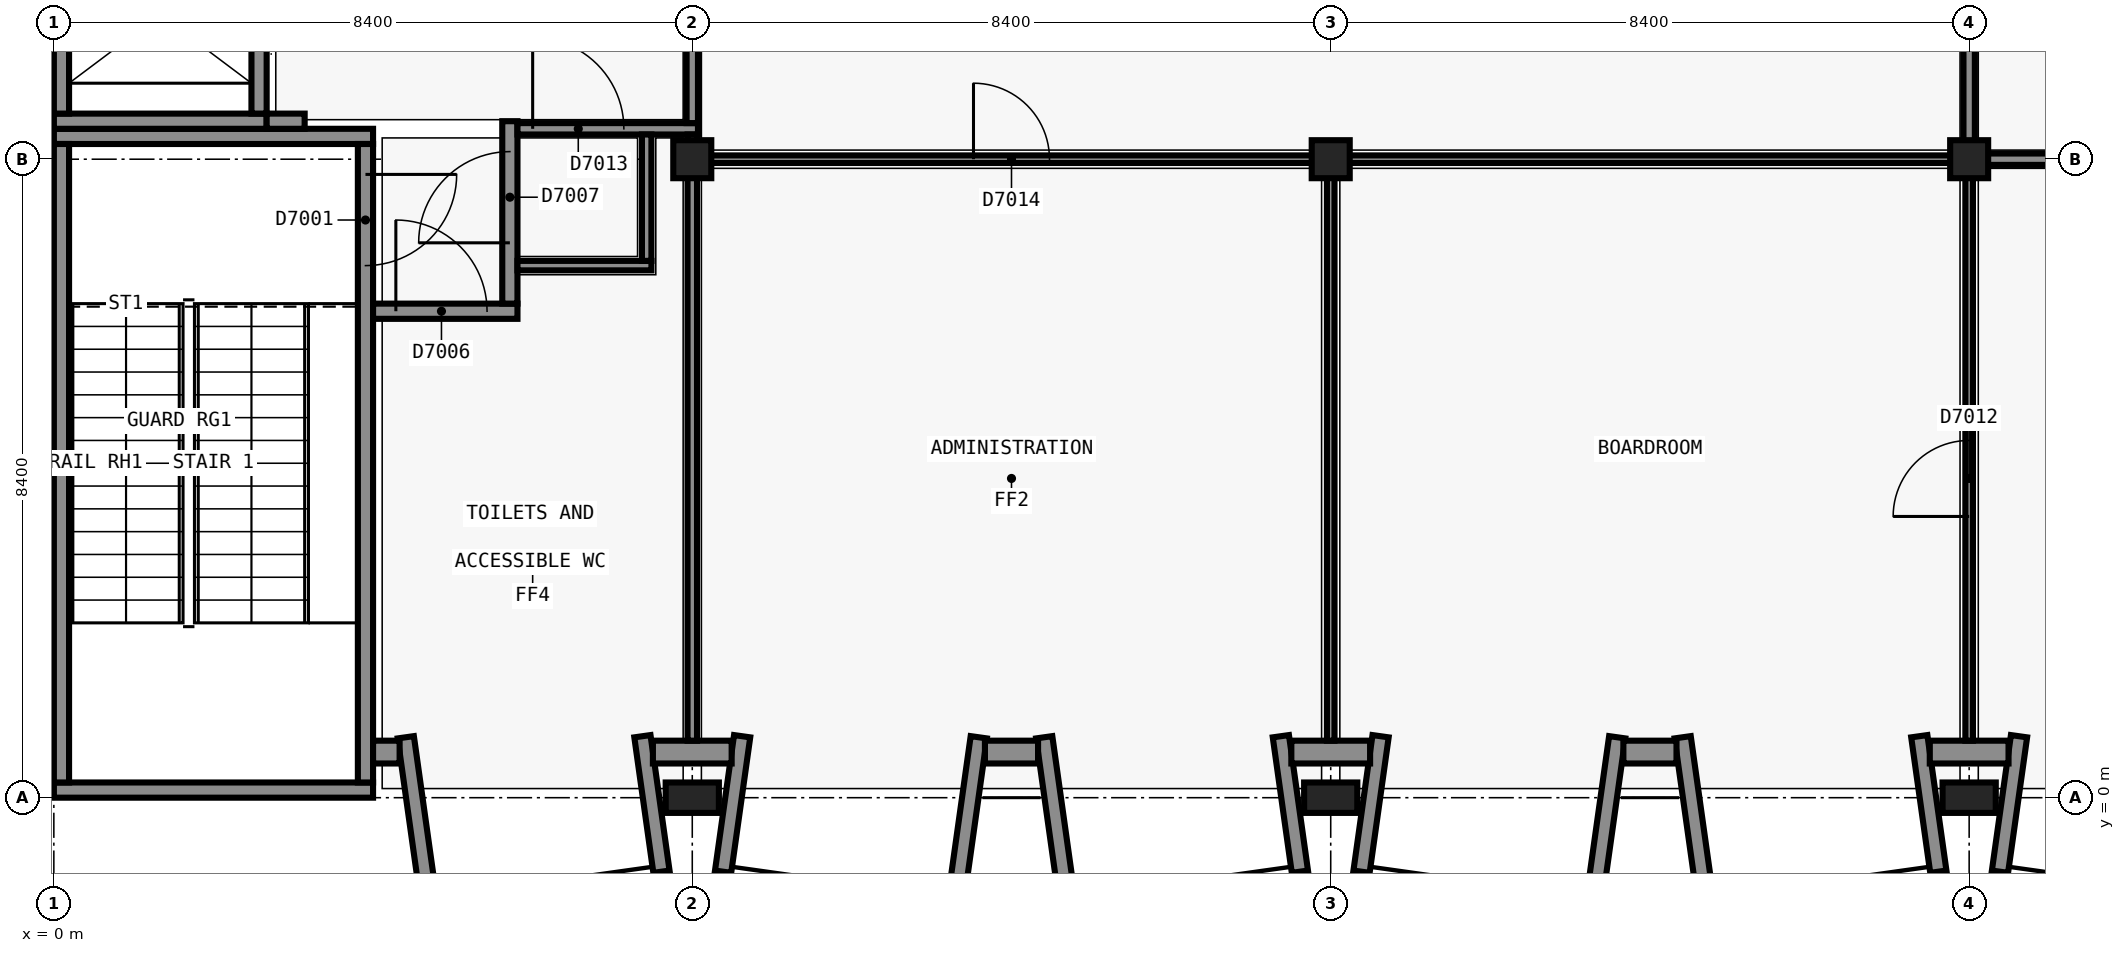
"""IFC4 building model, lengths in metres.
Left out: names, types, materials, properties, quantities, classifications, styles, units other than length and angle.
Written with IfcOpenShell. Run it as: python <this file> out.ifc"""

import sys

from ifc_helpers import new_model, si_unit, direction, frame, frame_2d, origin, origin_2d, place, context, subcontext, project, spatial, rectangle, extrude, element, fill, save


model = new_model("IFC4")
c1 = context("Model", 3, precision=1e-05, world=origin(), true_north=direction((0.0, 1.0)))
c2 = subcontext(c1, "Body", "Model", "MODEL_VIEW")
j1 = project(units=[si_unit("LENGTHUNIT", "METRE"), si_unit("PLANEANGLEUNIT", "RADIAN")], contexts=[c1])
p1 = place(None, origin())
s1 = spatial("IfcSite", under=j1, at=p1, CompositionType="ELEMENT")
p2 = place(p1, origin())
s2 = spatial("IfcBuilding", under=s1, at=p2, CompositionType="ELEMENT")
p3 = place(p2, frame((0.0, 0.0, 33.6)))
s3 = spatial("IfcBuildingStorey", under=s2, at=p3, CompositionType="ELEMENT", Elevation=33.6)
for number, where, z_axis, x_axis in (
    (1, (4.2, 0.1, 0.0), (0.0, 0.0, 1.0), (-1.0, 0.0, 0.0)),
    (2, (0.0, 8.7, 0.0), (0.0, 0.0, 1.0), (1.0, 0.0, 0.0)),
):
    element("IfcWall", number, at=place(p3, frame(where, z_axis=z_axis, x_axis=x_axis)), inside=s3, PredefinedType="SHEAR", context=c2, shape_type="SweptSolid", body=[
        extrude(rectangle(XDim=4.199, YDim=0.2, at=frame_2d((2.1, 0.0))), origin(), (0.0, 0.0, 1.0), 4.5),
    ])
p4 = place(p3, frame((0.1, 0.2, 0.0), z_axis=(0.0, 0.0, 1.0), x_axis=(0.0, 1.0, 0.0)))
e3 = element("IfcWall", 3, at=p4, inside=s3, PredefinedType="SHEAR", context=c2, shape_type="SweptSolid", body=[
    extrude(rectangle(XDim=8.4, YDim=0.2, at=frame_2d((4.2, 0.0))), origin(), (0.0, 0.0, 1.0), 4.5),
])
p5 = place(p3, frame((4.1, 8.6, 0.0), z_axis=(0.0, 0.0, 1.0), x_axis=(0.0, -1.0, 0.0)))
e4 = element("IfcWall", 4, at=p5, inside=s3, PredefinedType="SHEAR", context=c2, shape_type="SweptSolid", body=[
    extrude(rectangle(XDim=8.4, YDim=0.2, at=frame_2d((4.2, 0.0))), origin(), (0.0, 0.0, 1.0), 4.5),
])
p6 = place(p5, frame((0.4, 0.0, 0.0)))
e5 = element("IfcOpeningElement", 5, at=p6, cuts=e4, PredefinedType="OPENING", context=c2, shape_type="SweptSolid", body=[
    extrude(rectangle(XDim=1.2, YDim=2.1, at=frame_2d((0.6, 1.05))), frame((0.0, 0.11, 0.0), z_axis=(0.0, -1.0, 0.0), x_axis=(1.0, 0.0, 0.0)), (0.0, 0.0, 1.0), 0.22),
])
p7 = place(p3, frame((2.8, 8.9, 0.0), z_axis=(0.0, 0.0, 1.0), x_axis=(-1.0, 0.0, 0.0)))
e6 = element("IfcWall", 6, at=p7, inside=s3, PredefinedType="SHEAR", context=c2, shape_type="SweptSolid", body=[
    extrude(rectangle(XDim=2.8, YDim=0.2, at=frame_2d((1.4, 0.0))), origin(), (0.0, 0.0, 1.0), 4.5),
])
p8 = place(p3, frame((0.1, 9.0, 0.0), z_axis=(0.0, 0.0, 1.0), x_axis=(0.0, 1.0, 0.0)))
e7 = element("IfcWall", 7, at=p8, inside=s3, PredefinedType="SHEAR", context=c2, shape_type="SweptSolid", body=[
    extrude(rectangle(XDim=2.7, YDim=0.2, at=frame_2d((1.35, 0.0))), origin(), (0.0, 0.0, 1.0), 4.5),
])
p9 = place(p3, frame((2.7, 11.7, 0.0), z_axis=(0.0, 0.0, 1.0), x_axis=(0.0, -1.0, 0.0)))
e8 = element("IfcWall", 8, at=p9, inside=s3, PredefinedType="SHEAR", context=c2, shape_type="SweptSolid", body=[
    extrude(rectangle(XDim=2.7, YDim=0.2, at=frame_2d((1.35, 0.0))), origin(), (0.0, 0.0, 1.0), 4.5),
])
p10 = place(p9, frame((0.85, 0.0, 0.0)))
e9 = element("IfcOpeningElement", 9, at=p10, cuts=e8, PredefinedType="OPENING", context=c2, shape_type="SweptSolid", body=[
    extrude(rectangle(XDim=1.1, YDim=2.1, at=frame_2d((0.55, 1.05))), frame((0.0, 0.11, 0.0), z_axis=(0.0, -1.0, 0.0), x_axis=(1.0, 0.0, 0.0)), (0.0, 0.0, 1.0), 0.22),
])
p11 = place(p3, frame((8.4, 0.0, 0.0), z_axis=(0.0, 0.0, 1.0), x_axis=(1.0, 0.0, 0.0)))
e10 = element("IfcColumn", 10, at=p11, inside=s3, PredefinedType="COLUMN", context=c2, shape_type="SweptSolid", body=[
    extrude(rectangle(XDim=0.7, YDim=0.4, at=origin_2d()), origin(), (0.0, 0.0, 1.0), 4.5),
])
p12 = place(p3, frame((8.4, 8.4, 0.0), z_axis=(0.0, 0.0, 1.0), x_axis=(1.0, 0.0, 0.0)))
e11 = element("IfcColumn", 11, at=p12, inside=s3, PredefinedType="COLUMN", context=c2, shape_type="SweptSolid", body=[
    extrude(rectangle(XDim=0.5, YDim=0.5, at=origin_2d()), origin(), (0.0, 0.0, 1.0), 4.5),
])
p13 = place(p3, frame((16.8, 0.0, 0.0), z_axis=(0.0, 0.0, 1.0), x_axis=(1.0, 0.0, 0.0)))
e12 = element("IfcColumn", 12, at=p13, inside=s3, PredefinedType="COLUMN", context=c2, shape_type="SweptSolid", body=[
    extrude(rectangle(XDim=0.7, YDim=0.4, at=origin_2d()), origin(), (0.0, 0.0, 1.0), 4.5),
])
p14 = place(p3, frame((16.8, 8.4, 0.0), z_axis=(0.0, 0.0, 1.0), x_axis=(1.0, 0.0, 0.0)))
e13 = element("IfcColumn", 13, at=p14, inside=s3, PredefinedType="COLUMN", context=c2, shape_type="SweptSolid", body=[
    extrude(rectangle(XDim=0.5, YDim=0.5, at=origin_2d()), origin(), (0.0, 0.0, 1.0), 4.5),
])
p15 = place(p3, frame((25.2, 0.0, 0.0), z_axis=(0.0, 0.0, 1.0), x_axis=(1.0, 0.0, 0.0)))
e14 = element("IfcColumn", 14, at=p15, inside=s3, PredefinedType="COLUMN", context=c2, shape_type="SweptSolid", body=[
    extrude(rectangle(XDim=0.7, YDim=0.4, at=origin_2d()), origin(), (0.0, 0.0, 1.0), 4.5),
])
p16 = place(p3, frame((25.2, 8.4, 0.0), z_axis=(0.0, 0.0, 1.0), x_axis=(1.0, 0.0, 0.0)))
e15 = element("IfcColumn", 15, at=p16, inside=s3, PredefinedType="COLUMN", context=c2, shape_type="SweptSolid", body=[
    extrude(rectangle(XDim=0.5, YDim=0.5, at=origin_2d()), origin(), (0.0, 0.0, 1.0), 4.5),
])
p17 = place(p3, frame((3.3, 8.9, 0.0), z_axis=(0.0, 0.0, 1.0), x_axis=(-1.0, 0.0, 0.0)))
e16 = element("IfcWall", 16, at=p17, inside=s3, PredefinedType="SHEAR", context=c2, shape_type="SweptSolid", body=[
    extrude(rectangle(XDim=0.5, YDim=0.2, at=frame_2d((0.25, 0.0))), origin(), (0.0, 0.0, 1.0), 4.5),
])
p18 = place(p3, frame((4.631, 0.795, 0.0), z_axis=(0.0, 0.0, 1.0), x_axis=(0.139141913905, -0.990272451295, 0.0)))
e17 = element("IfcWall", 17, at=p18, inside=s3, PredefinedType="SOLIDWALL", context=c2, shape_type="SweptSolid", body=[
    extrude(rectangle(XDim=2.219, YDim=0.215, at=frame_2d((1.11, 0.0))), origin(), (0.0, 0.0, 1.0), 4.2),
])
for number, where, z_axis, x_axis in (
    (18, (7.744, 0.809, 0.0), (0.0, 0.0, 1.0), (0.139, -0.99, 0.0)),
    (19, (9.056, 0.809, 0.0), (0.0, 0.0, 1.0), (-0.139, -0.99, 0.0)),
):
    element("IfcWall", number, at=place(p3, frame(where, z_axis=z_axis, x_axis=x_axis)), inside=s3, PredefinedType="SOLIDWALL", context=c2, shape_type="SweptSolid", body=[
        extrude(rectangle(XDim=1.8, YDim=0.215, at=frame_2d((0.9, 0.0))), origin(), (0.0, 0.0, 1.0), 4.2),
    ])
p19 = place(p3, frame((12.169, 0.795, 0.0), z_axis=(0.0, 0.0, 1.0), x_axis=(-0.139141913905, -0.990272451295, 0.0)))
e20 = element("IfcWall", 20, at=p19, inside=s3, PredefinedType="SOLIDWALL", context=c2, shape_type="SweptSolid", body=[
    extrude(rectangle(XDim=2.219, YDim=0.215, at=frame_2d((1.11, 0.0))), origin(), (0.0, 0.0, 1.0), 4.2),
])
p20 = place(p3, frame((13.031, 0.795, 0.0), z_axis=(0.0, 0.0, 1.0), x_axis=(0.139249775508, -0.99025728981, 0.0)))
e21 = element("IfcWall", 21, at=p20, inside=s3, PredefinedType="SOLIDWALL", context=c2, shape_type="SweptSolid", body=[
    extrude(rectangle(XDim=2.22, YDim=0.215, at=frame_2d((1.11, 0.0))), origin(), (0.0, 0.0, 1.0), 4.2),
])
for number, where, z_axis, x_axis in (
    (22, (16.144, 0.809, 0.0), (0.0, 0.0, 1.0), (0.139, -0.99, 0.0)),
    (23, (17.456, 0.809, 0.0), (0.0, 0.0, 1.0), (-0.139, -0.99, 0.0)),
):
    element("IfcWall", number, at=place(p3, frame(where, z_axis=z_axis, x_axis=x_axis)), inside=s3, PredefinedType="SOLIDWALL", context=c2, shape_type="SweptSolid", body=[
        extrude(rectangle(XDim=1.8, YDim=0.215, at=frame_2d((0.9, 0.0))), origin(), (0.0, 0.0, 1.0), 4.2),
    ])
for number, where, z_axis, x_axis in (
    (24, (20.569, 0.795, 0.0), (0.0, 0.0, 1.0), (-0.139, -0.99, 0.0)),
    (25, (21.431, 0.795, 0.0), (0.0, 0.0, 1.0), (0.139, -0.99, 0.0)),
):
    element("IfcWall", number, at=place(p3, frame(where, z_axis=z_axis, x_axis=x_axis)), inside=s3, PredefinedType="SOLIDWALL", context=c2, shape_type="SweptSolid", body=[
        extrude(rectangle(XDim=2.219, YDim=0.215, at=frame_2d((1.11, 0.0))), origin(), (0.0, 0.0, 1.0), 4.2),
    ])
for number, where, z_axis, x_axis in (
    (26, (24.544, 0.809, 0.0), (0.0, 0.0, 1.0), (0.139, -0.99, 0.0)),
    (27, (25.856, 0.809, 0.0), (0.0, 0.0, 1.0), (-0.139, -0.99, 0.0)),
):
    element("IfcWall", number, at=place(p3, frame(where, z_axis=z_axis, x_axis=x_axis)), inside=s3, PredefinedType="SOLIDWALL", context=c2, shape_type="SweptSolid", body=[
        extrude(rectangle(XDim=1.8, YDim=0.215, at=frame_2d((0.9, 0.0))), origin(), (0.0, 0.0, 1.0), 4.2),
    ])
p21 = place(p3, frame((4.55, 0.6, 0.0), z_axis=(0.0, 0.0, 1.0), x_axis=(-1.0, 0.0, 0.0)))
e28 = element("IfcWall", 28, at=p21, inside=s3, PredefinedType="SOLIDWALL", context=c2, shape_type="SweptSolid", body=[
    extrude(rectangle(XDim=0.349, YDim=0.3, at=frame_2d((0.175, 0.0))), origin(), (0.0, 0.0, 1.0), 4.2),
])
p22 = place(p3, frame((8.918, 0.6, 0.0), z_axis=(0.0, 0.0, 1.0), x_axis=(-1.0, 0.0, 0.0)))
e29 = element("IfcWall", 29, at=p22, inside=s3, PredefinedType="SOLIDWALL", context=c2, shape_type="SweptSolid", body=[
    extrude(rectangle(XDim=1.036, YDim=0.3, at=frame_2d((0.518, 0.0))), origin(), (0.0, 0.0, 1.0), 4.2),
])
p23 = place(p3, frame((12.949, 0.6, 0.0), z_axis=(0.0, 0.0, 1.0), x_axis=(-1.0, 0.0, 0.0)))
e30 = element("IfcWall", 30, at=p23, inside=s3, PredefinedType="SOLIDWALL", context=c2, shape_type="SweptSolid", body=[
    extrude(rectangle(XDim=0.699, YDim=0.3, at=frame_2d((0.35, 0.0))), origin(), (0.0, 0.0, 1.0), 4.2),
])
p24 = place(p3, frame((17.318, 0.6, 0.0), z_axis=(0.0, 0.0, 1.0), x_axis=(-1.0, 0.0, 0.0)))
e31 = element("IfcWall", 31, at=p24, inside=s3, PredefinedType="SOLIDWALL", context=c2, shape_type="SweptSolid", body=[
    extrude(rectangle(XDim=1.036, YDim=0.3, at=frame_2d((0.518, 0.0))), origin(), (0.0, 0.0, 1.0), 4.2),
])
p25 = place(p3, frame((21.35, 0.6, 0.0), z_axis=(0.0, 0.0, 1.0), x_axis=(-1.0, 0.0, 0.0)))
e32 = element("IfcWall", 32, at=p25, inside=s3, PredefinedType="SOLIDWALL", context=c2, shape_type="SweptSolid", body=[
    extrude(rectangle(XDim=0.699, YDim=0.3, at=frame_2d((0.35, 0.0))), origin(), (0.0, 0.0, 1.0), 4.2),
])
p26 = place(p3, frame((25.718, 0.6, 0.0), z_axis=(0.0, 0.0, 1.0), x_axis=(-1.0, 0.0, 0.0)))
e33 = element("IfcWall", 33, at=p26, inside=s3, PredefinedType="SOLIDWALL", context=c2, shape_type="SweptSolid", body=[
    extrude(rectangle(XDim=1.036, YDim=0.3, at=frame_2d((0.518, 0.0))), origin(), (0.0, 0.0, 1.0), 4.2),
])
p27 = place(p3, frame((4.2, 6.4, 0.0), z_axis=(0.0, 0.0, 1.0), x_axis=(1.0, 0.0, 0.0)))
e34 = element("IfcWall", 34, at=p27, inside=s3, PredefinedType="SOLIDWALL", context=c2, shape_type="SweptSolid", body=[
    extrude(rectangle(XDim=1.9, YDim=0.2, at=frame_2d((0.95, 0.0))), origin(), (0.0, 0.0, 1.0), 4.2),
])
p28 = place(p27, frame((0.3, 0.0, 0.0)))
e35 = element("IfcOpeningElement", 35, at=p28, cuts=e34, PredefinedType="OPENING", context=c2, shape_type="SweptSolid", body=[
    extrude(rectangle(XDim=1.2, YDim=2.1, at=frame_2d((0.6, 1.05))), frame((0.0, 0.11, 0.0), z_axis=(0.0, -1.0, 0.0), x_axis=(1.0, 0.0, 0.0)), (0.0, 0.0, 1.0), 0.22),
])
p29 = place(p3, frame((6.0, 6.5, 0.0), z_axis=(0.0, 0.0, 1.0), x_axis=(0.0, 1.0, 0.0)))
e36 = element("IfcWall", 36, at=p29, inside=s3, PredefinedType="SOLIDWALL", context=c2, shape_type="SweptSolid", body=[
    extrude(rectangle(XDim=2.4, YDim=0.2, at=frame_2d((1.2, 0.0))), origin(), (0.0, 0.0, 1.0), 3.7),
])
p30 = place(p29, frame((0.8, 0.0, 0.0)))
e37 = element("IfcOpeningElement", 37, at=p30, cuts=e36, PredefinedType="OPENING", context=c2, shape_type="SweptSolid", body=[
    extrude(rectangle(XDim=1.2, YDim=2.1, at=frame_2d((0.6, 1.05))), frame((0.0, 0.11, 0.0), z_axis=(0.0, -1.0, 0.0), x_axis=(1.0, 0.0, 0.0)), (0.0, 0.0, 1.0), 0.22),
])
p31 = place(p3, frame((25.125, 8.4, 0.0), z_axis=(0.0, 0.0, 1.0), x_axis=(1.0, 0.0, 0.0)))
e38 = element("IfcWall", 38, at=p31, inside=s3, PredefinedType="PARTITIONING", context=c2, shape_type="SweptSolid", body=[
    extrude(rectangle(XDim=2.375, YDim=0.15, at=frame_2d((1.188, 0.0))), origin(), (0.0, 0.0, 1.0), 3.5),
])
p32 = place(p3, frame((6.1, 8.8, 0.0), z_axis=(0.0, 0.0, 1.0), x_axis=(1.0, 0.0, 0.0)))
e39 = element("IfcWall", 39, at=p32, inside=s3, PredefinedType="SOLIDWALL", context=c2, shape_type="SweptSolid", body=[
    extrude(rectangle(XDim=2.375, YDim=0.15, at=frame_2d((1.188, 0.0))), origin(), (0.0, 0.0, 1.0), 3.5),
])
p33 = place(p32, frame((0.2, 0.0, 0.0)))
e40 = element("IfcOpeningElement", 40, at=p33, cuts=e39, PredefinedType="OPENING", context=c2, shape_type="SweptSolid", body=[
    extrude(rectangle(XDim=1.2, YDim=2.1, at=frame_2d((0.6, 1.05))), frame((0.0, 0.085, 0.0), z_axis=(0.0, -1.0, 0.0), x_axis=(1.0, 0.0, 0.0)), (0.0, 0.0, 1.0), 0.17),
])
p34 = place(p3, frame((25.2, 8.475, 0.0), z_axis=(0.0, 0.0, 1.0), x_axis=(0.0, 1.0, 0.0)))
e41 = element("IfcWall", 41, at=p34, inside=s3, PredefinedType="PARTITIONING", context=c2, shape_type="SweptSolid", body=[
    extrude(rectangle(XDim=4.2, YDim=0.15, at=frame_2d((2.1, 0.0))), origin(), (0.0, 0.0, 1.0), 3.5),
])
p35 = place(p34, frame((1.525, 0.0, 0.0)))
e42 = element("IfcOpeningElement", 42, at=p35, cuts=e41, PredefinedType="OPENING", context=c2, shape_type="SweptSolid", body=[
    extrude(rectangle(XDim=1.0, YDim=2.1, at=frame_2d((0.5, 1.05))), frame((0.0, 0.085, 0.0), z_axis=(0.0, -1.0, 0.0), x_axis=(1.0, 0.0, 0.0)), (0.0, 0.0, 1.0), 0.17),
])
p36 = place(p3, frame((8.4, 8.875, 0.0), z_axis=(0.0, 0.0, 1.0), x_axis=(0.0, 1.0, 0.0)))
e43 = element("IfcWall", 43, at=p36, inside=s3, PredefinedType="SOLIDWALL", context=c2, shape_type="SweptSolid", body=[
    extrude(rectangle(XDim=2.85, YDim=0.15, at=frame_2d((1.425, 0.0))), origin(), (0.0, 0.0, 1.0), 3.5),
])
p37 = place(p3, frame((6.1, 7.0, 0.0), z_axis=(0.0, 0.0, 1.0), x_axis=(1.0, 0.0, 0.0)))
e44 = element("IfcWall", 44, at=p37, inside=s3, PredefinedType="PARTITIONING", context=c2, shape_type="SweptSolid", body=[
    extrude(rectangle(XDim=1.762, YDim=0.125, at=frame_2d((0.881, 0.0))), origin(), (0.0, 0.0, 1.0), 4.2),
])
p38 = place(p3, frame((7.8, 7.062, 0.0), z_axis=(0.0, 0.0, 1.0), x_axis=(0.0, 1.0, 0.0)))
e45 = element("IfcWall", 45, at=p38, inside=s3, PredefinedType="PARTITIONING", context=c2, shape_type="SweptSolid", body=[
    extrude(rectangle(XDim=1.663, YDim=0.125, at=frame_2d((0.831, 0.0))), origin(), (0.0, 0.0, 1.0), 3.7),
])
p39 = place(p3, frame((8.4, 0.75, 0.0), z_axis=(0.0, 0.0, 1.0), x_axis=(0.0, 1.0, 0.0)))
e46 = element("IfcWall", 46, at=p39, inside=s3, PredefinedType="PARTITIONING", context=c2, shape_type="SweptSolid", body=[
    extrude(rectangle(XDim=7.975, YDim=0.125, at=frame_2d((3.988, 0.0))), origin(), (0.0, 0.0, 1.0), 3.5),
])
p40 = place(p3, frame((8.462, 8.4, 0.0), z_axis=(0.0, 0.0, 1.0), x_axis=(1.0, 0.0, 0.0)))
e47 = element("IfcWall", 47, at=p40, inside=s3, PredefinedType="PARTITIONING", context=c2, shape_type="SweptSolid", body=[
    extrude(rectangle(XDim=16.663, YDim=0.1, at=frame_2d((8.331, 0.0))), origin(), (0.0, 0.0, 1.0), 3.5),
])
p41 = place(p40, frame((3.637, 0.0, 0.0)))
e48 = element("IfcOpeningElement", 48, at=p41, cuts=e47, PredefinedType="OPENING", context=c2, shape_type="SweptSolid", body=[
    extrude(rectangle(XDim=1.0, YDim=2.1, at=frame_2d((0.5, 1.05))), frame((0.0, 0.06, 0.0), z_axis=(0.0, -1.0, 0.0), x_axis=(1.0, 0.0, 0.0)), (0.0, 0.0, 1.0), 0.12),
])
p42 = place(p3, frame((16.8, 0.75, 0.0), z_axis=(0.0, 0.0, 1.0), x_axis=(0.0, 1.0, 0.0)))
e49 = element("IfcWall", 49, at=p42, inside=s3, PredefinedType="PARTITIONING", context=c2, shape_type="SweptSolid", body=[
    extrude(rectangle(XDim=7.6, YDim=0.1, at=frame_2d((3.8, 0.0))), origin(), (0.0, 0.0, 1.0), 3.5),
])
p43 = place(p3, frame((25.2, 0.75, 0.0), z_axis=(0.0, 0.0, 1.0), x_axis=(0.0, 1.0, 0.0)))
e50 = element("IfcWall", 50, at=p43, inside=s3, PredefinedType="PARTITIONING", context=c2, shape_type="SweptSolid", body=[
    extrude(rectangle(XDim=7.575, YDim=0.1, at=frame_2d((3.788, 0.0))), origin(), (0.0, 0.0, 1.0), 3.5),
])
p44 = place(p43, frame((2.95, 0.0, 0.0)))
e51 = element("IfcOpeningElement", 51, at=p44, cuts=e50, PredefinedType="OPENING", context=c2, shape_type="SweptSolid", body=[
    extrude(rectangle(XDim=1.0, YDim=2.1, at=frame_2d((0.5, 1.05))), frame((0.0, 0.06, 0.0), z_axis=(0.0, -1.0, 0.0), x_axis=(1.0, 0.0, 0.0)), (0.0, 0.0, 1.0), 0.12),
])
p45 = place(p10, origin())
e52 = element("IfcDoor", 52, at=p45, inside=s3, OperationType="SLIDING_TO_LEFT", PredefinedType="DOOR", context=c2, shape_type="SweptSolid", body=[
    extrude(rectangle(XDim=1.1, YDim=2.1, at=frame_2d((0.55, 1.05))), frame((0.0, 0.025, 0.0), z_axis=(0.0, -1.0, 0.0), x_axis=(1.0, 0.0, 0.0)), (0.0, 0.0, 1.0), 0.05),
])
fill(e9, e52)
p46 = place(p6, origin())
e53 = element("IfcDoor", 53, at=p46, inside=s3, OperationType="SINGLE_SWING_RIGHT", PredefinedType="DOOR", context=c2, shape_type="SweptSolid", body=[
    extrude(rectangle(XDim=1.2, YDim=2.1, at=frame_2d((0.6, 1.05))), frame((0.0, 0.025, 0.0), z_axis=(0.0, -1.0, 0.0), x_axis=(1.0, 0.0, 0.0)), (0.0, 0.0, 1.0), 0.05),
])
fill(e5, e53)
p47 = place(p28, origin())
e54 = element("IfcDoor", 54, at=p47, inside=s3, OperationType="SINGLE_SWING_LEFT", PredefinedType="DOOR", context=c2, shape_type="SweptSolid", body=[
    extrude(rectangle(XDim=1.2, YDim=2.1, at=frame_2d((0.6, 1.05))), frame((0.0, 0.025, 0.0), z_axis=(0.0, -1.0, 0.0), x_axis=(1.0, 0.0, 0.0)), (0.0, 0.0, 1.0), 0.05),
])
fill(e35, e54)
p48 = place(p30, origin())
e55 = element("IfcDoor", 55, at=p48, inside=s3, OperationType="SINGLE_SWING_RIGHT", PredefinedType="DOOR", context=c2, shape_type="SweptSolid", body=[
    extrude(rectangle(XDim=1.2, YDim=2.1, at=frame_2d((0.6, 1.05))), frame((0.0, 0.025, 0.0), z_axis=(0.0, -1.0, 0.0), x_axis=(1.0, 0.0, 0.0)), (0.0, 0.0, 1.0), 0.05),
])
fill(e37, e55)
p49 = place(p44, origin())
e56 = element("IfcDoor", 56, at=p49, inside=s3, OperationType="SINGLE_SWING_RIGHT", PredefinedType="DOOR", context=c2, shape_type="SweptSolid", body=[
    extrude(rectangle(XDim=1.0, YDim=2.1, at=frame_2d((0.5, 1.05))), frame((0.0, 0.025, 0.0), z_axis=(0.0, -1.0, 0.0), x_axis=(1.0, 0.0, 0.0)), (0.0, 0.0, 1.0), 0.05),
])
fill(e51, e56)
p50 = place(p33, origin())
e57 = element("IfcDoor", 57, at=p50, inside=s3, OperationType="SINGLE_SWING_RIGHT", PredefinedType="DOOR", context=c2, shape_type="SweptSolid", body=[
    extrude(rectangle(XDim=1.2, YDim=2.1, at=frame_2d((0.6, 1.05))), frame((0.0, 0.025, 0.0), z_axis=(0.0, -1.0, 0.0), x_axis=(1.0, 0.0, 0.0)), (0.0, 0.0, 1.0), 0.05),
])
fill(e40, e57)
p51 = place(p41, origin())
e58 = element("IfcDoor", 58, at=p51, inside=s3, OperationType="SINGLE_SWING_RIGHT", PredefinedType="DOOR", context=c2, shape_type="SweptSolid", body=[
    extrude(rectangle(XDim=1.0, YDim=2.1, at=frame_2d((0.5, 1.05))), frame((0.0, 0.025, 0.0), z_axis=(0.0, -1.0, 0.0), x_axis=(1.0, 0.0, 0.0)), (0.0, 0.0, 1.0), 0.05),
])
fill(e48, e58)
save(model, sys.argv[1])
